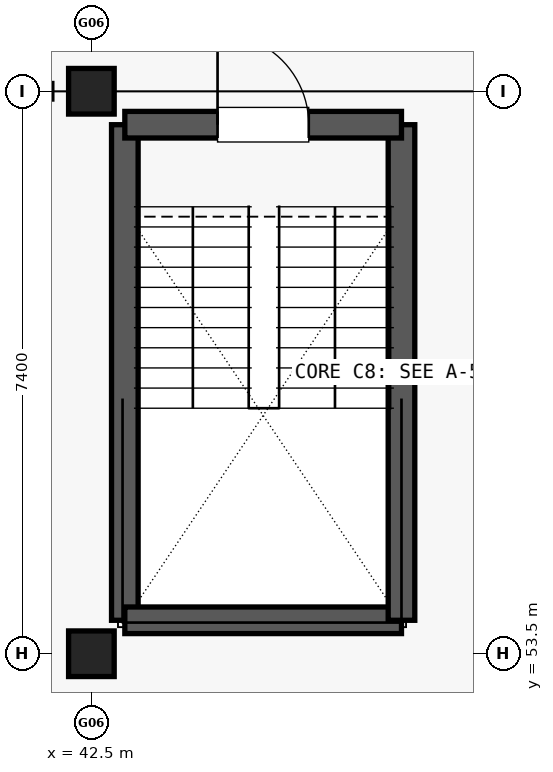
"""IFC4 building model, lengths in metres.
Left out: names, types, materials, properties, quantities, classifications, styles, units other than length and angle.
Written with IfcOpenShell. Run it as: python <this file> out.ifc"""

import sys

from ifc_helpers import new_model, si_unit, direction, frame, frame_2d, origin, origin_2d, place, context, subcontext, project, spatial, rectangle, extrude, element, fill, save


model = new_model("IFC4")
c1 = context("Model", 3, precision=1e-05, world=origin(), true_north=direction((0.0, 1.0)))
c2 = subcontext(c1, "Body", "Model", "MODEL_VIEW")
j1 = project(units=[si_unit("LENGTHUNIT", "METRE"), si_unit("PLANEANGLEUNIT", "RADIAN")], contexts=[c1])
p1 = place(None, origin())
s1 = spatial("IfcSite", under=j1, at=p1, CompositionType="ELEMENT")
p2 = place(p1, origin())
s2 = spatial("IfcBuilding", under=s1, at=p2, CompositionType="ELEMENT")
p3 = place(p2, frame((0.0, 0.0, 10.2)))
s3 = spatial("IfcBuildingStorey", under=s2, at=p3, CompositionType="ELEMENT", Elevation=10.2)
for number, where, z_axis, x_axis in (
    (1, (42.5, 53.5, 0.0), (0.0, 0.0, 1.0), (1.0, 0.0, 0.0)),
    (2, (42.5, 60.9, 0.0), (0.0, 0.0, 1.0), (1.0, 0.0, 0.0)),
):
    element("IfcColumn", number, at=place(p3, frame(where, z_axis=z_axis, x_axis=x_axis)), inside=s3, PredefinedType="COLUMN", context=c2, shape_type="SweptSolid", body=[
        extrude(rectangle(XDim=0.6, YDim=0.6, at=origin_2d()), origin(), (0.0, 0.0, 1.0), 3.37),
    ])
p4 = place(p3, frame((42.94, 53.94, 0.0), z_axis=(0.0, 0.0, 1.0), x_axis=(0.0, 1.0, 0.0)))
e3 = element("IfcWall", 3, at=p4, inside=s3, PredefinedType="SHEAR", context=c2, shape_type="SweptSolid", body=[
    extrude(rectangle(XDim=6.52, YDim=0.35, at=frame_2d((3.26, 0.0))), origin(), (0.0, 0.0, 1.0), 3.365),
])
p5 = place(p3, frame((42.94, 53.94, 0.0), z_axis=(0.0, 0.0, 1.0), x_axis=(1.0, 0.0, 0.0)))
e4 = element("IfcWall", 4, at=p5, inside=s3, PredefinedType="SHEAR", context=c2, shape_type="SweptSolid", body=[
    extrude(rectangle(XDim=3.64, YDim=0.35, at=frame_2d((1.82, 0.0))), origin(), (0.0, 0.0, 1.0), 3.365),
])
p6 = place(p3, frame((46.58, 53.94, 0.0), z_axis=(0.0, 0.0, 1.0), x_axis=(0.0, 1.0, 0.0)))
e5 = element("IfcWall", 5, at=p6, inside=s3, PredefinedType="SHEAR", context=c2, shape_type="SweptSolid", body=[
    extrude(rectangle(XDim=6.52, YDim=0.35, at=frame_2d((3.26, 0.0))), origin(), (0.0, 0.0, 1.0), 3.365),
])
p7 = place(p3, frame((42.94, 60.46, 0.0), z_axis=(0.0, 0.0, 1.0), x_axis=(1.0, 0.0, 0.0)))
e6 = element("IfcWall", 6, at=p7, inside=s3, PredefinedType="SHEAR", context=c2, shape_type="SweptSolid", body=[
    extrude(rectangle(XDim=3.64, YDim=0.35, at=frame_2d((1.82, 0.0))), origin(), (0.0, 0.0, 1.0), 3.365),
])
p8 = place(p7, frame((1.22, 0.0, 0.0)))
e7 = element("IfcOpeningElement", 7, at=p8, cuts=e6, PredefinedType="OPENING", context=c2, shape_type="SweptSolid", body=[
    extrude(rectangle(XDim=1.2, YDim=2.15, at=frame_2d((0.6, 1.075))), frame((0.0, 0.185, 0.0), z_axis=(0.0, -1.0, 0.0), x_axis=(1.0, 0.0, 0.0)), (0.0, 0.0, 1.0), 0.37),
])
p9 = place(p8, origin())
e8 = element("IfcDoor", 8, at=p9, inside=s3, OperationType="SINGLE_SWING_LEFT", PredefinedType="DOOR", context=c2, shape_type="SweptSolid", body=[
    extrude(rectangle(XDim=1.2, YDim=2.15, at=frame_2d((0.6, 1.075))), frame((0.0, 0.025, 0.0), z_axis=(0.0, -1.0, 0.0), x_axis=(1.0, 0.0, 0.0)), (0.0, 0.0, 1.0), 0.05),
])
fill(e7, e8)
save(model, sys.argv[1])
